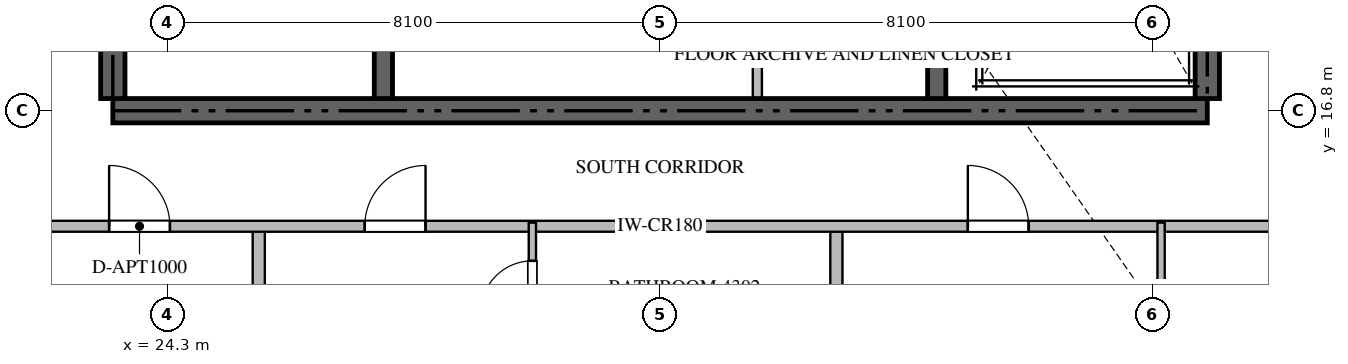
"""IFC4 building model, lengths in metres.
Left out: names, types, materials, properties, quantities, classifications, styles, units other than length and angle.
Written with IfcOpenShell. Run it as: python <this file> out.ifc"""

import sys

from ifc_helpers import new_model, si_unit, direction, frame, frame_2d, origin, place, context, subcontext, project, spatial, rectangle, extrude, source, transform, mapped, element, fill, save


model = new_model("IFC4")
c1 = context("Model", 3, precision=1e-05, world=origin(), true_north=direction((0.0, 1.0)))
c2 = subcontext(c1, "Body", "Model", "MODEL_VIEW")
j1 = project(units=[si_unit("LENGTHUNIT", "METRE"), si_unit("PLANEANGLEUNIT", "RADIAN")], contexts=[c1])
p1 = place(None, origin())
s1 = spatial("IfcSite", under=j1, at=p1, CompositionType="ELEMENT")
p2 = place(p1, origin())
s2 = spatial("IfcBuilding", under=s1, at=p2, CompositionType="ELEMENT")
p3 = place(p2, frame((0.0, 0.0, 172.65)))
s3 = spatial("IfcBuildingStorey", under=s2, at=p3, CompositionType="ELEMENT", Elevation=172.65)
p4 = place(p3, frame((23.4, 16.8, -0.26), z_axis=(0.0, 0.0, 1.0), x_axis=(1.0, 0.0, 0.0)))
e1 = element("IfcWall", 1, at=p4, inside=s3, PredefinedType="SHEAR", context=c2, shape_type="SweptSolid", body=[
    extrude(rectangle(XDim=18.0, YDim=0.4, at=frame_2d((9.0, 0.0))), origin(), (0.0, 0.0, 1.0), 3.748),
])
p5 = place(p3, frame((23.4, 17.0, -0.26), z_axis=(0.0, 0.0, 1.0), x_axis=(0.0, 1.0, 0.0)))
e2 = element("IfcWall", 2, at=p5, inside=s3, PredefinedType="SHEAR", context=c2, shape_type="SweptSolid", body=[
    extrude(rectangle(XDim=4.85, YDim=0.4, at=frame_2d((2.425, 0.0))), origin(), (0.0, 0.0, 1.0), 3.748),
])
p6 = place(p3, frame((41.4, 17.0, -0.26), z_axis=(0.0, 0.0, 1.0), x_axis=(0.0, 1.0, 0.0)))
e3 = element("IfcWall", 3, at=p6, inside=s3, PredefinedType="SHEAR", context=c2, shape_type="SweptSolid", body=[
    extrude(rectangle(XDim=8.35, YDim=0.4, at=frame_2d((4.175, 0.0))), origin(), (0.0, 0.0, 1.0), 3.748),
])
p7 = place(p3, frame((27.85, 17.0, -0.26), z_axis=(0.0, 0.0, 1.0), x_axis=(0.0, 1.0, 0.0)))
e4 = element("IfcWall", 4, at=p7, inside=s3, PredefinedType="SHEAR", context=c2, shape_type="SweptSolid", body=[
    extrude(rectangle(XDim=4.85, YDim=0.3, at=frame_2d((2.425, 0.0))), origin(), (0.0, 0.0, 1.0), 3.748),
])
p8 = place(p3, frame((36.95, 17.0, -0.26), z_axis=(0.0, 0.0, 1.0), x_axis=(0.0, 1.0, 0.0)))
e5 = element("IfcWall", 5, at=p8, inside=s3, PredefinedType="SHEAR", context=c2, shape_type="SweptSolid", body=[
    extrude(rectangle(XDim=8.35, YDim=0.3, at=frame_2d((4.175, 0.0))), origin(), (0.0, 0.0, 1.0), 3.748),
])
p9 = place(p3, frame((34.0, 17.02, 0.0), z_axis=(0.0, 0.0, 1.0), x_axis=(0.0, 1.0, 0.0)))
e6 = element("IfcWall", 6, at=p9, inside=s3, PredefinedType="PARTITIONING", context=c2, shape_type="SweptSolid", body=[
    extrude(rectangle(XDim=2.73, YDim=0.15, at=frame_2d((1.365, 0.0))), origin(), (0.0, 0.0, 1.0), 3.49),
])
for number, where, z_axis, x_axis in (
    (7, (25.8, 1.482, 0.0), (0.0, 0.0, 1.0), (0.0, 1.0, 0.0)),
    (8, (35.3, 1.482, 0.0), (0.0, 0.0, 1.0), (0.0, 1.0, 0.0)),
):
    element("IfcWall", number, at=place(p3, frame(where, z_axis=z_axis, x_axis=x_axis)), inside=s3, PredefinedType="PARTITIONING", context=c2, shape_type="SweptSolid", body=[
        extrude(rectangle(XDim=13.418, YDim=0.2, at=frame_2d((6.709, 0.0))), origin(), (0.0, 0.0, 1.0), 3.49),
    ])
p10 = place(p3, frame((20.952, 14.9, 0.0), z_axis=(0.0, 0.0, 1.0), x_axis=(1.0, 0.0, 0.0)))
e9 = element("IfcWall", 9, at=p10, inside=s3, PredefinedType="PARTITIONING", context=c2, shape_type="SweptSolid", body=[
    extrude(rectangle(XDim=22.896, YDim=0.18, at=frame_2d((11.448, 0.0))), origin(), (0.0, 0.0, 1.0), 3.49),
])
p11 = place(p10, frame((2.387, 0.0, 0.0)))
e10 = element("IfcOpeningElement", 10, at=p11, cuts=e9, PredefinedType="OPENING", context=c2, shape_type="SweptSolid", body=[
    extrude(rectangle(XDim=1.0, YDim=2.15, at=frame_2d((0.5, 1.075))), frame((0.0, 0.1, 0.0), z_axis=(0.0, -1.0, 0.0), x_axis=(1.0, 0.0, 0.0)), (0.0, 0.0, 1.0), 0.2),
])
p12 = place(p10, frame((6.591, 0.0, 0.0)))
e11 = element("IfcOpeningElement", 11, at=p12, cuts=e9, PredefinedType="OPENING", context=c2, shape_type="SweptSolid", body=[
    extrude(rectangle(XDim=1.0, YDim=2.15, at=frame_2d((0.5, 1.075))), frame((0.0, 0.1, 0.0), z_axis=(0.0, -1.0, 0.0), x_axis=(1.0, 0.0, 0.0)), (0.0, 0.0, 1.0), 0.2),
])
p13 = place(p10, frame((16.51, 0.0, 0.0)))
e12 = element("IfcOpeningElement", 12, at=p13, cuts=e9, PredefinedType="OPENING", context=c2, shape_type="SweptSolid", body=[
    extrude(rectangle(XDim=1.0, YDim=2.15, at=frame_2d((0.5, 1.075))), frame((0.0, 0.1, 0.0), z_axis=(0.0, -1.0, 0.0), x_axis=(1.0, 0.0, 0.0)), (0.0, 0.0, 1.0), 0.2),
])
p14 = place(p3, frame((30.3, 12.852, 0.0), z_axis=(0.0, 0.0, 1.0), x_axis=(0.0, 1.0, 0.0)))
e13 = element("IfcWall", 13, at=p14, inside=s3, PredefinedType="PARTITIONING", context=c2, shape_type="SweptSolid", body=[
    extrude(rectangle(XDim=2.108, YDim=0.12, at=frame_2d((1.054, 0.0))), origin(), (0.0, 0.0, 1.0), 3.49),
])
p15 = place(p14, frame((0.629, 0.0, 0.0)))
e14 = element("IfcOpeningElement", 14, at=p15, cuts=e13, PredefinedType="OPENING", context=c2, shape_type="SweptSolid", body=[
    extrude(rectangle(XDim=0.85, YDim=2.1, at=frame_2d((0.425, 1.05))), frame((0.0, 0.07, 0.0), z_axis=(0.0, -1.0, 0.0), x_axis=(1.0, 0.0, 0.0)), (0.0, 0.0, 1.0), 0.14),
])
p16 = place(p3, frame((40.64, 12.15, 0.0), z_axis=(0.0, 0.0, 1.0), x_axis=(0.0, 1.0, 0.0)))
e15 = element("IfcWall", 15, at=p16, inside=s3, PredefinedType="PARTITIONING", context=c2, shape_type="SweptSolid", body=[
    extrude(rectangle(XDim=2.81, YDim=0.12, at=frame_2d((1.405, 0.0))), origin(), (0.0, 0.0, 1.0), 3.49),
])
m1 = source(origin(), c2, "Body", "SweptSolid", [
    extrude(rectangle(XDim=1.0, YDim=2.15, at=frame_2d((0.5, 1.075))), frame((0.0, 0.025, 0.0), z_axis=(0.0, -1.0, 0.0), x_axis=(1.0, 0.0, 0.0)), (0.0, 0.0, 1.0), 0.05),
])
p17 = place(p11, origin())
e16 = element("IfcDoor", 16, at=p17, inside=s3, OperationType="SINGLE_SWING_LEFT", PredefinedType="DOOR", context=c2, shape_type="MappedRepresentation", body=[
    mapped(m1, transform((0.0, 0.0, 0.0), scale=1.0)),
])
fill(e10, e16)
p18 = place(p12, origin())
e17 = element("IfcDoor", 17, at=p18, inside=s3, OperationType="SINGLE_SWING_RIGHT", PredefinedType="DOOR", context=c2, shape_type="MappedRepresentation", body=[
    mapped(m1, transform((0.0, 0.0, 0.0), scale=1.0)),
])
fill(e11, e17)
p19 = place(p13, origin())
e18 = element("IfcDoor", 18, at=p19, inside=s3, OperationType="SINGLE_SWING_LEFT", PredefinedType="DOOR", context=c2, shape_type="MappedRepresentation", body=[
    mapped(m1, transform((0.0, 0.0, 0.0), scale=1.0)),
])
fill(e12, e18)
m2 = source(origin(), c2, "Body", "SweptSolid", [
    extrude(rectangle(XDim=0.85, YDim=2.1, at=frame_2d((0.425, 1.05))), frame((0.0, 0.025, 0.0), z_axis=(0.0, -1.0, 0.0), x_axis=(1.0, 0.0, 0.0)), (0.0, 0.0, 1.0), 0.05),
])
p20 = place(p15, origin())
e19 = element("IfcDoor", 19, at=p20, inside=s3, OperationType="SINGLE_SWING_LEFT", PredefinedType="DOOR", context=c2, shape_type="MappedRepresentation", body=[
    mapped(m2, transform((0.0, 0.0, 0.0), scale=1.0)),
])
fill(e14, e19)
save(model, sys.argv[1])
